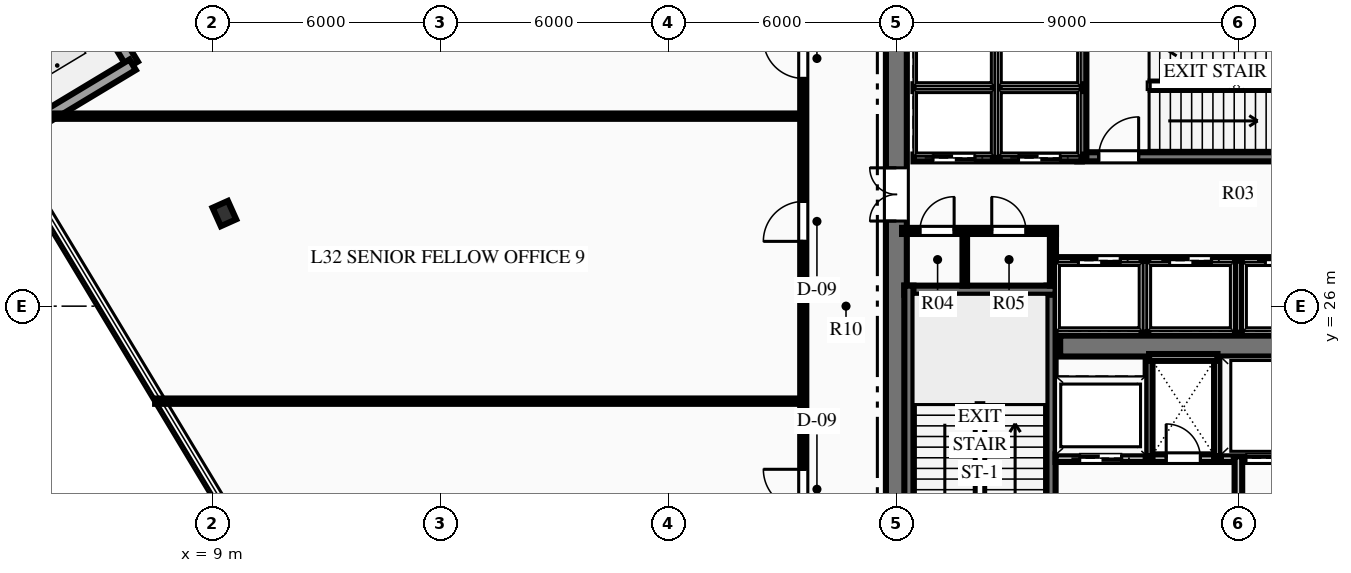
"""IFC4 building model, lengths in metres.
Left out: names, types, materials, properties, quantities, classifications, styles, units other than length and angle.
Written with IfcOpenShell. Run it as: python <this file> out.ifc"""

import sys

from ifc_helpers import new_model, si_unit, direction, frame, frame_2d, origin, origin_2d, place, context, subcontext, project, spatial, rectangle, i_section, extrude, element, fill, save


model = new_model("IFC4")
c1 = context("Model", 3, precision=1e-05, world=origin(), true_north=direction((0.0, 1.0)))
c2 = subcontext(c1, "Body", "Model", "MODEL_VIEW")
j1 = project(units=[si_unit("LENGTHUNIT", "METRE"), si_unit("PLANEANGLEUNIT", "RADIAN")], contexts=[c1])
p1 = place(None, origin())
s1 = spatial("IfcSite", under=j1, at=p1, CompositionType="ELEMENT")
p2 = place(p1, origin())
s2 = spatial("IfcBuilding", under=s1, at=p2, CompositionType="ELEMENT")
p3 = place(p2, frame((0.0, 0.0, 131.7)))
s3 = spatial("IfcBuildingStorey", under=s2, at=p3, CompositionType="ELEMENT", Elevation=131.7)
p4 = place(p3, frame((27.0, 18.275, 0.0), z_axis=(0.0, 0.0, 1.0), x_axis=(0.0, 1.0, 0.0)))
e1 = element("IfcWall", 1, at=p4, inside=s3, PredefinedType="SHEAR", context=c2, shape_type="SweptSolid", body=[
    extrude(rectangle(XDim=15.45, YDim=0.55, at=frame_2d((7.725, 0.0))), origin(), (0.0, 0.0, 1.0), 4.5),
])
p5 = place(p4, frame((9.965, 0.0, 0.0)))
e2 = element("IfcOpeningElement", 2, at=p5, cuts=e1, PredefinedType="OPENING", context=c2, shape_type="SweptSolid", body=[
    extrude(rectangle(XDim=1.4, YDim=2.2, at=frame_2d((0.7, 1.1))), frame((0.0, 0.285, 0.0), z_axis=(0.0, -1.0, 0.0), x_axis=(1.0, 0.0, 0.0)), (0.0, 0.0, 1.0), 0.57),
])
p6 = place(p3, frame((31.31, 24.95, 0.0), z_axis=(0.0, 0.0, 1.0), x_axis=(1.0, 0.0, 0.0)))
e3 = element("IfcWall", 3, at=p6, inside=s3, PredefinedType="SHEAR", context=c2, shape_type="SweptSolid", body=[
    extrude(rectangle(XDim=9.38, YDim=0.55, at=frame_2d((4.69, 0.0))), origin(), (0.0, 0.0, 1.0), 4.5),
])
p7 = place(p3, frame((31.07, 18.28, 0.0), z_axis=(0.0, 0.0, 1.0), x_axis=(0.0, 1.0, 0.0)))
e4 = element("IfcWall", 4, at=p7, inside=s3, PredefinedType="SHEAR", context=c2, shape_type="SweptSolid", body=[
    extrude(rectangle(XDim=8.26, YDim=0.24, at=frame_2d((4.13, 0.0))), origin(), (0.0, 0.0, 1.0), 4.5),
])
p8 = place(p7, frame((0.365, 0.0, 0.0)))
e5 = element("IfcOpeningElement", 5, at=p8, cuts=e4, PredefinedType="OPENING", context=c2, shape_type="SweptSolid", body=[
    extrude(rectangle(XDim=1.05, YDim=2.15, at=frame_2d((0.525, 1.075))), frame((0.0, 0.13, 0.0), z_axis=(0.0, -1.0, 0.0), x_axis=(1.0, 0.0, 0.0)), (0.0, 0.0, 1.0), 0.26),
])
p9 = place(p3, frame((27.21, 26.42, 0.0), z_axis=(0.0, 0.0, 1.0), x_axis=(1.0, 0.0, 0.0)))
e6 = element("IfcWall", 6, at=p9, inside=s3, PredefinedType="SHEAR", context=c2, shape_type="SweptSolid", body=[
    extrude(rectangle(XDim=3.98, YDim=0.24, at=frame_2d((1.99, 0.0))), origin(), (0.0, 0.0, 1.0), 4.5),
])
p10 = place(p3, frame((27.33, 18.28, 0.0), z_axis=(0.0, 0.0, 1.0), x_axis=(0.0, 1.0, 0.0)))
e7 = element("IfcWall", 7, at=p10, inside=s3, PredefinedType="SHEAR", context=c2, shape_type="SweptSolid", body=[
    extrude(rectangle(XDim=8.26, YDim=0.24, at=frame_2d((4.13, 0.0))), origin(), (0.0, 0.0, 1.0), 4.5),
])
p11 = place(p3, frame((31.76, 29.93, 0.0), z_axis=(0.0, 0.0, 1.0), x_axis=(1.0, 0.0, 0.0)))
e8 = element("IfcWall", 8, at=p11, inside=s3, PredefinedType="SHEAR", context=c2, shape_type="SweptSolid", body=[
    extrude(rectangle(XDim=8.38, YDim=0.24, at=frame_2d((4.19, 0.0))), origin(), (0.0, 0.0, 1.0), 4.5),
])
p12 = place(p11, frame((0.565, 0.0, 0.0)))
e9 = element("IfcOpeningElement", 9, at=p12, cuts=e8, PredefinedType="OPENING", context=c2, shape_type="SweptSolid", body=[
    extrude(rectangle(XDim=1.05, YDim=2.15, at=frame_2d((0.525, 1.075))), frame((0.0, 0.13, 0.0), z_axis=(0.0, -1.0, 0.0), x_axis=(1.0, 0.0, 0.0)), (0.0, 0.0, 1.0), 0.26),
])
p13 = place(p3, frame((31.88, 29.93, 0.0), z_axis=(0.0, 0.0, 1.0), x_axis=(0.0, 1.0, 0.0)))
e10 = element("IfcWall", 10, at=p13, inside=s3, PredefinedType="SHEAR", context=c2, shape_type="SweptSolid", body=[
    extrude(rectangle(XDim=3.79, YDim=0.24, at=frame_2d((1.895, 0.0))), origin(), (0.0, 0.0, 1.0), 4.5),
])
p14 = place(p3, frame((9.318, 28.437, 0.0), z_axis=(0.0, 0.0, 1.0), x_axis=(0.912477494148, 0.409126902895, 0.0)))
e11 = element("IfcColumn", 11, at=p14, inside=s3, PredefinedType="COLUMN", context=c2, shape_type="SweptSolid", body=[
    extrude(i_section(OverallWidth=0.442, OverallDepth=0.531, WebThickness=0.066, FlangeThickness=0.106, at=origin_2d()), origin(), (0.0, 0.0, 1.0), 4.5),
])
p15 = place(p3, frame((6.904, 32.353, 0.0), z_axis=(0.0, 0.0, 1.0), x_axis=(-0.515773637009, 0.856724900634, 0.0)))
e12 = element("IfcWall", 12, at=p15, inside=s3, PredefinedType="STANDARD", context=c2, shape_type="SweptSolid", body=[
    extrude(rectangle(XDim=4.1, YDim=0.32, at=frame_2d((2.05, 0.0))), origin(), (0.0, 0.0, 1.0), 4.1),
])
p16 = place(p15, frame((1.475, 0.0, 0.0)))
e13 = element("IfcOpeningElement", 13, at=p16, cuts=e12, PredefinedType="OPENING", context=c2, shape_type="SweptSolid", body=[
    extrude(rectangle(XDim=1.15, YDim=2.2, at=frame_2d((0.575, 1.1))), frame((0.0, 0.17, 0.0), z_axis=(0.0, -1.0, 0.0), x_axis=(1.0, 0.0, 0.0)), (0.0, 0.0, 1.0), 0.34),
])
p17 = place(p3, frame((3.392, 30.238, 0.0), z_axis=(0.0, 0.0, 1.0), x_axis=(0.856724900634, 0.515773637009, 0.0)))
e14 = element("IfcWall", 14, at=p17, inside=s3, PredefinedType="STANDARD", context=c2, shape_type="SweptSolid", body=[
    extrude(rectangle(XDim=4.1, YDim=0.32, at=frame_2d((2.05, 0.0))), origin(), (0.0, 0.0, 1.0), 4.1),
])
p18 = place(p3, frame((36.0, 18.28, 0.0), z_axis=(0.0, 0.0, 1.0), x_axis=(0.0, 1.0, 0.0)))
e15 = element("IfcWall", 15, at=p18, inside=s3, PredefinedType="PARTITIONING", context=c2, shape_type="SweptSolid", body=[
    extrude(rectangle(XDim=3.77, YDim=0.2, at=frame_2d((1.885, 0.0))), origin(), (0.0, 0.0, 1.0), 4.1),
])
p19 = place(p3, frame((31.19, 22.0, 0.0), z_axis=(0.0, 0.0, 1.0), x_axis=(1.0, 0.0, 0.0)))
e16 = element("IfcWall", 16, at=p19, inside=s3, PredefinedType="PARTITIONING", context=c2, shape_type="SweptSolid", body=[
    extrude(rectangle(XDim=4.69, YDim=0.2, at=frame_2d((2.345, 0.0))), origin(), (0.0, 0.0, 1.0), 4.1),
])
p20 = place(p19, frame((2.91, 0.0, 0.0)))
e17 = element("IfcOpeningElement", 17, at=p20, cuts=e16, PredefinedType="OPENING", context=c2, shape_type="SweptSolid", body=[
    extrude(rectangle(XDim=0.9, YDim=2.15, at=frame_2d((0.45, 1.075))), frame((0.0, 0.11, 0.0), z_axis=(0.0, -1.0, 0.0), x_axis=(1.0, 0.0, 0.0)), (0.0, 0.0, 1.0), 0.22),
])
p21 = place(p19, frame((0.635, 0.0, 0.0)))
e18 = element("IfcOpeningElement", 18, at=p21, cuts=e16, PredefinedType="OPENING", context=c2, shape_type="SweptSolid", body=[
    extrude(rectangle(XDim=1.1, YDim=2.15, at=frame_2d((0.55, 1.075))), frame((0.0, 0.11, 0.0), z_axis=(0.0, -1.0, 0.0), x_axis=(1.0, 0.0, 0.0)), (0.0, 0.0, 1.0), 0.22),
])
p22 = place(p3, frame((36.12, 22.0, 0.0), z_axis=(0.0, 0.0, 1.0), x_axis=(1.0, 0.0, 0.0)))
e19 = element("IfcWall", 19, at=p22, inside=s3, PredefinedType="PARTITIONING", context=c2, shape_type="SweptSolid", body=[
    extrude(rectangle(XDim=4.69, YDim=0.2, at=frame_2d((2.345, 0.0))), origin(), (0.0, 0.0, 1.0), 4.1),
])
p23 = place(p22, frame((2.955, 0.0, 0.0)))
e20 = element("IfcOpeningElement", 20, at=p23, cuts=e19, PredefinedType="OPENING", context=c2, shape_type="SweptSolid", body=[
    extrude(rectangle(XDim=1.1, YDim=2.15, at=frame_2d((0.55, 1.075))), frame((0.0, 0.11, 0.0), z_axis=(0.0, -1.0, 0.0), x_axis=(1.0, 0.0, 0.0)), (0.0, 0.0, 1.0), 0.22),
])
p24 = place(p22, frame((0.08, 0.0, 0.0)))
e21 = element("IfcOpeningElement", 21, at=p24, cuts=e19, PredefinedType="OPENING", context=c2, shape_type="SweptSolid", body=[
    extrude(rectangle(XDim=1.4, YDim=2.2, at=frame_2d((0.7, 1.1))), frame((0.0, 0.11, 0.0), z_axis=(0.0, -1.0, 0.0), x_axis=(1.0, 0.0, 0.0)), (0.0, 0.0, 1.0), 0.22),
])
for number, where, z_axis, x_axis in (
    (22, (33.65, 22.05, 0.0), (0.0, 0.0, 1.0), (0.0, 1.0, 0.0)),
    (23, (35.45, 22.05, 0.0), (0.0, 0.0, 1.0), (0.0, 1.0, 0.0)),
):
    element("IfcWall", number, at=place(p3, frame(where, z_axis=z_axis, x_axis=x_axis)), inside=s3, PredefinedType="PARTITIONING", context=c2, shape_type="SweptSolid", body=[
        extrude(rectangle(XDim=2.6, YDim=0.18, at=frame_2d((1.3, 0.0))), origin(), (0.0, 0.0, 1.0), 4.1),
    ])
p25 = place(p3, frame((33.65, 24.65, 0.0), z_axis=(0.0, 0.0, 1.0), x_axis=(1.0, 0.0, 0.0)))
e24 = element("IfcWall", 24, at=p25, inside=s3, PredefinedType="PARTITIONING", context=c2, shape_type="SweptSolid", body=[
    extrude(rectangle(XDim=1.8, YDim=0.18, at=frame_2d((0.9, 0.0))), origin(), (0.0, 0.0, 1.0), 4.1),
])
p26 = place(p3, frame((27.15, 27.98, 0.0), z_axis=(0.0, 0.0, 1.0), x_axis=(1.0, 0.0, 0.0)))
e25 = element("IfcWall", 25, at=p26, inside=s3, PredefinedType="PARTITIONING", context=c2, shape_type="SweptSolid", body=[
    extrude(rectangle(XDim=4.05, YDim=0.16, at=frame_2d((2.025, 0.0))), origin(), (0.0, 0.0, 1.0), 4.1),
])
p27 = place(p26, frame((0.47, 0.0, 0.0)))
e26 = element("IfcOpeningElement", 26, at=p27, cuts=e25, PredefinedType="OPENING", context=c2, shape_type="SweptSolid", body=[
    extrude(rectangle(XDim=0.9, YDim=2.15, at=frame_2d((0.45, 1.075))), frame((0.0, 0.09, 0.0), z_axis=(0.0, -1.0, 0.0), x_axis=(1.0, 0.0, 0.0)), (0.0, 0.0, 1.0), 0.18),
])
p28 = place(p26, frame((2.36, 0.0, 0.0)))
e27 = element("IfcOpeningElement", 27, at=p28, cuts=e25, PredefinedType="OPENING", context=c2, shape_type="SweptSolid", body=[
    extrude(rectangle(XDim=0.9, YDim=2.15, at=frame_2d((0.45, 1.075))), frame((0.0, 0.09, 0.0), z_axis=(0.0, -1.0, 0.0), x_axis=(1.0, 0.0, 0.0)), (0.0, 0.0, 1.0), 0.18),
])
p29 = place(p3, frame((31.12, 26.54, 0.0), z_axis=(0.0, 0.0, 1.0), x_axis=(0.0, 1.0, 0.0)))
e28 = element("IfcWall", 28, at=p29, inside=s3, PredefinedType="PARTITIONING", context=c2, shape_type="SweptSolid", body=[
    extrude(rectangle(XDim=1.51, YDim=0.16, at=frame_2d((0.755, 0.0))), origin(), (0.0, 0.0, 1.0), 4.1),
])
p30 = place(p3, frame((28.8, 26.54, 0.0), z_axis=(0.0, 0.0, 1.0), x_axis=(0.0, 1.0, 0.0)))
e29 = element("IfcWall", 29, at=p30, inside=s3, PredefinedType="PARTITIONING", context=c2, shape_type="SweptSolid", body=[
    extrude(rectangle(XDim=1.44, YDim=0.12, at=frame_2d((0.72, 0.0))), origin(), (0.0, 0.0, 1.0), 4.1),
])
p31 = place(p3, frame((27.45, 29.9, 0.0), z_axis=(0.0, 0.0, 1.0), x_axis=(1.0, 0.0, 0.0)))
e30 = element("IfcWall", 30, at=p31, inside=s3, PredefinedType="PARTITIONING", context=c2, shape_type="SweptSolid", body=[
    extrude(rectangle(XDim=4.43, YDim=0.18, at=frame_2d((2.215, 0.0))), origin(), (0.0, 0.0, 1.0), 4.1),
])
p32 = place(p31, frame((0.515, 0.0, 0.0)))
e31 = element("IfcOpeningElement", 31, at=p32, cuts=e30, PredefinedType="OPENING", context=c2, shape_type="SweptSolid", body=[
    extrude(rectangle(XDim=1.1, YDim=2.15, at=frame_2d((0.55, 1.075))), frame((0.0, 0.1, 0.0), z_axis=(0.0, -1.0, 0.0), x_axis=(1.0, 0.0, 0.0)), (0.0, 0.0, 1.0), 0.2),
])
p33 = place(p31, frame((2.765, 0.0, 0.0)))
e32 = element("IfcOpeningElement", 32, at=p33, cuts=e30, PredefinedType="OPENING", context=c2, shape_type="SweptSolid", body=[
    extrude(rectangle(XDim=1.1, YDim=2.15, at=frame_2d((0.55, 1.075))), frame((0.0, 0.1, 0.0), z_axis=(0.0, -1.0, 0.0), x_axis=(1.0, 0.0, 0.0)), (0.0, 0.0, 1.0), 0.2),
])
p34 = place(p3, frame((27.45, 31.75, 0.0), z_axis=(0.0, 0.0, 1.0), x_axis=(1.0, 0.0, 0.0)))
e33 = element("IfcWall", 33, at=p34, inside=s3, PredefinedType="PARTITIONING", context=c2, shape_type="SweptSolid", body=[
    extrude(rectangle(XDim=4.43, YDim=0.18, at=frame_2d((2.215, 0.0))), origin(), (0.0, 0.0, 1.0), 4.1),
])
p35 = place(p3, frame((29.63, 29.9, 0.0), z_axis=(0.0, 0.0, 1.0), x_axis=(0.0, 1.0, 0.0)))
e34 = element("IfcWall", 34, at=p35, inside=s3, PredefinedType="PARTITIONING", context=c2, shape_type="SweptSolid", body=[
    extrude(rectangle(XDim=3.75, YDim=0.18, at=frame_2d((1.875, 0.0))), origin(), (0.0, 0.0, 1.0), 4.1),
])
p36 = place(p3, frame((31.2, 27.2, 0.0), z_axis=(0.0, 0.0, 1.0), x_axis=(1.0, 0.0, 0.0)))
e35 = element("IfcWall", 35, at=p36, inside=s3, PredefinedType="PARTITIONING", context=c2, shape_type="SweptSolid", body=[
    extrude(rectangle(XDim=9.6, YDim=0.18, at=frame_2d((4.8, 0.0))), origin(), (0.0, 0.0, 1.0), 4.1),
])
p37 = place(p36, frame((0.59, 0.0, 0.0)))
e36 = element("IfcOpeningElement", 36, at=p37, cuts=e35, PredefinedType="OPENING", context=c2, shape_type="SweptSolid", body=[
    extrude(rectangle(XDim=1.1, YDim=2.15, at=frame_2d((0.55, 1.075))), frame((0.0, 0.1, 0.0), z_axis=(0.0, -1.0, 0.0), x_axis=(1.0, 0.0, 0.0)), (0.0, 0.0, 1.0), 0.2),
])
p38 = place(p36, frame((2.99, 0.0, 0.0)))
e37 = element("IfcOpeningElement", 37, at=p38, cuts=e35, PredefinedType="OPENING", context=c2, shape_type="SweptSolid", body=[
    extrude(rectangle(XDim=1.1, YDim=2.15, at=frame_2d((0.55, 1.075))), frame((0.0, 0.1, 0.0), z_axis=(0.0, -1.0, 0.0), x_axis=(1.0, 0.0, 0.0)), (0.0, 0.0, 1.0), 0.2),
])
p39 = place(p36, frame((5.51, 0.0, 0.0)))
e38 = element("IfcOpeningElement", 38, at=p39, cuts=e35, PredefinedType="OPENING", context=c2, shape_type="SweptSolid", body=[
    extrude(rectangle(XDim=1.1, YDim=2.15, at=frame_2d((0.55, 1.075))), frame((0.0, 0.1, 0.0), z_axis=(0.0, -1.0, 0.0), x_axis=(1.0, 0.0, 0.0)), (0.0, 0.0, 1.0), 0.2),
])
p40 = place(p36, frame((7.91, 0.0, 0.0)))
e39 = element("IfcOpeningElement", 39, at=p40, cuts=e35, PredefinedType="OPENING", context=c2, shape_type="SweptSolid", body=[
    extrude(rectangle(XDim=1.1, YDim=2.15, at=frame_2d((0.55, 1.075))), frame((0.0, 0.1, 0.0), z_axis=(0.0, -1.0, 0.0), x_axis=(1.0, 0.0, 0.0)), (0.0, 0.0, 1.0), 0.2),
])
for number, where, z_axis, x_axis in (
    (40, (33.54, 25.3, 0.0), (0.0, 0.0, 1.0), (0.0, 1.0, 0.0)),
    (41, (36.0, 25.3, 0.0), (0.0, 0.0, 1.0), (0.0, 1.0, 0.0)),
):
    element("IfcWall", number, at=place(p3, frame(where, z_axis=z_axis, x_axis=x_axis)), inside=s3, PredefinedType="PARTITIONING", context=c2, shape_type="SweptSolid", body=[
        extrude(rectangle(XDim=1.9, YDim=0.18, at=frame_2d((0.95, 0.0))), origin(), (0.0, 0.0, 1.0), 4.1),
    ])
p41 = place(p3, frame((24.55, 15.55, 0.0), z_axis=(0.0, 0.0, 1.0), x_axis=(0.0, 1.0, 0.0)))
e42 = element("IfcWall", 42, at=p41, inside=s3, PredefinedType="PARTITIONING", context=c2, shape_type="SweptSolid", body=[
    extrude(rectangle(XDim=20.9, YDim=0.16, at=frame_2d((10.45, 0.0))), origin(), (0.0, 0.0, 1.0), 4.1),
])
p42 = place(p41, frame((5.107, 0.0, 0.0)))
e43 = element("IfcOpeningElement", 43, at=p42, cuts=e42, PredefinedType="OPENING", context=c2, shape_type="SweptSolid", body=[
    extrude(rectangle(XDim=1.05, YDim=2.15, at=frame_2d((0.525, 1.075))), frame((0.0, 0.09, 0.0), z_axis=(0.0, -1.0, 0.0), x_axis=(1.0, 0.0, 0.0)), (0.0, 0.0, 1.0), 0.18),
])
p43 = place(p41, frame((12.155, 0.0, 0.0)))
e44 = element("IfcOpeningElement", 44, at=p43, cuts=e42, PredefinedType="OPENING", context=c2, shape_type="SweptSolid", body=[
    extrude(rectangle(XDim=1.05, YDim=2.15, at=frame_2d((0.525, 1.075))), frame((0.0, 0.09, 0.0), z_axis=(0.0, -1.0, 0.0), x_axis=(1.0, 0.0, 0.0)), (0.0, 0.0, 1.0), 0.18),
])
p44 = place(p41, frame((16.443, 0.0, 0.0)))
e45 = element("IfcOpeningElement", 45, at=p44, cuts=e42, PredefinedType="OPENING", context=c2, shape_type="SweptSolid", body=[
    extrude(rectangle(XDim=1.05, YDim=2.15, at=frame_2d((0.525, 1.075))), frame((0.0, 0.09, 0.0), z_axis=(0.0, -1.0, 0.0), x_axis=(1.0, 0.0, 0.0)), (0.0, 0.0, 1.0), 0.18),
])
p45 = place(p3, frame((7.495, 23.5, 0.0), z_axis=(0.0, 0.0, 1.0), x_axis=(1.0, 0.0, 0.0)))
e46 = element("IfcWall", 46, at=p45, inside=s3, PredefinedType="PARTITIONING", context=c2, shape_type="SweptSolid", body=[
    extrude(rectangle(XDim=17.055, YDim=0.14, at=frame_2d((8.527, 0.0))), origin(), (0.0, 0.0, 1.0), 4.1),
])
p46 = place(p3, frame((4.734, 31.0, 0.0), z_axis=(0.0, 0.0, 1.0), x_axis=(1.0, 0.0, 0.0)))
e47 = element("IfcWall", 47, at=p46, inside=s3, PredefinedType="PARTITIONING", context=c2, shape_type="SweptSolid", body=[
    extrude(rectangle(XDim=19.816, YDim=0.14, at=frame_2d((9.908, 0.0))), origin(), (0.0, 0.0, 1.0), 4.1),
])
p47 = place(p27, origin())
e48 = element("IfcDoor", 48, at=p47, inside=s3, OperationType="SINGLE_SWING_RIGHT", PredefinedType="DOOR", context=c2, shape_type="SweptSolid", body=[
    extrude(rectangle(XDim=0.9, YDim=2.15, at=frame_2d((0.45, 1.075))), frame((0.0, 0.025, 0.0), z_axis=(0.0, -1.0, 0.0), x_axis=(1.0, 0.0, 0.0)), (0.0, 0.0, 1.0), 0.05),
])
fill(e26, e48)
p48 = place(p28, origin())
e49 = element("IfcDoor", 49, at=p48, inside=s3, OperationType="SINGLE_SWING_LEFT", PredefinedType="DOOR", context=c2, shape_type="SweptSolid", body=[
    extrude(rectangle(XDim=0.9, YDim=2.15, at=frame_2d((0.45, 1.075))), frame((0.0, 0.025, 0.0), z_axis=(0.0, -1.0, 0.0), x_axis=(1.0, 0.0, 0.0)), (0.0, 0.0, 1.0), 0.05),
])
fill(e27, e49)
p49 = place(p12, origin())
e50 = element("IfcDoor", 50, at=p49, inside=s3, OperationType="SINGLE_SWING_RIGHT", PredefinedType="DOOR", context=c2, shape_type="SweptSolid", body=[
    extrude(rectangle(XDim=1.05, YDim=2.15, at=frame_2d((0.525, 1.075))), frame((0.0, 0.025, 0.0), z_axis=(0.0, -1.0, 0.0), x_axis=(1.0, 0.0, 0.0)), (0.0, 0.0, 1.0), 0.05),
])
fill(e9, e50)
p50 = place(p20, origin())
e51 = element("IfcDoor", 51, at=p50, inside=s3, OperationType="SINGLE_SWING_LEFT", PredefinedType="DOOR", context=c2, shape_type="SweptSolid", body=[
    extrude(rectangle(XDim=0.9, YDim=2.15, at=frame_2d((0.45, 1.075))), frame((0.0, 0.025, 0.0), z_axis=(0.0, -1.0, 0.0), x_axis=(1.0, 0.0, 0.0)), (0.0, 0.0, 1.0), 0.05),
])
fill(e17, e51)
p51 = place(p5, origin())
e52 = element("IfcDoor", 52, at=p51, inside=s3, OperationType="DOUBLE_DOOR_SINGLE_SWING", PredefinedType="DOOR", context=c2, shape_type="SweptSolid", body=[
    extrude(rectangle(XDim=1.4, YDim=2.2, at=frame_2d((0.7, 1.1))), frame((0.0, 0.025, 0.0), z_axis=(0.0, -1.0, 0.0), x_axis=(1.0, 0.0, 0.0)), (0.0, 0.0, 1.0), 0.05),
])
fill(e2, e52)
p52 = place(p42, origin())
e53 = element("IfcDoor", 53, at=p52, inside=s3, OperationType="SINGLE_SWING_RIGHT", PredefinedType="DOOR", context=c2, shape_type="SweptSolid", body=[
    extrude(rectangle(XDim=1.05, YDim=2.15, at=frame_2d((0.525, 1.075))), frame((0.0, 0.025, 0.0), z_axis=(0.0, -1.0, 0.0), x_axis=(1.0, 0.0, 0.0)), (0.0, 0.0, 1.0), 0.05),
])
fill(e43, e53)
p53 = place(p43, origin())
e54 = element("IfcDoor", 54, at=p53, inside=s3, OperationType="SINGLE_SWING_LEFT", PredefinedType="DOOR", context=c2, shape_type="SweptSolid", body=[
    extrude(rectangle(XDim=1.05, YDim=2.15, at=frame_2d((0.525, 1.075))), frame((0.0, 0.025, 0.0), z_axis=(0.0, -1.0, 0.0), x_axis=(1.0, 0.0, 0.0)), (0.0, 0.0, 1.0), 0.05),
])
fill(e44, e54)
p54 = place(p44, origin())
e55 = element("IfcDoor", 55, at=p54, inside=s3, OperationType="SINGLE_SWING_RIGHT", PredefinedType="DOOR", context=c2, shape_type="SweptSolid", body=[
    extrude(rectangle(XDim=1.05, YDim=2.15, at=frame_2d((0.525, 1.075))), frame((0.0, 0.025, 0.0), z_axis=(0.0, -1.0, 0.0), x_axis=(1.0, 0.0, 0.0)), (0.0, 0.0, 1.0), 0.05),
])
fill(e45, e55)
p55 = place(p32, origin())
e56 = element("IfcDoor", 56, at=p55, inside=s3, OperationType="SLIDING_TO_LEFT", PredefinedType="DOOR", context=c2, shape_type="SweptSolid", body=[
    extrude(rectangle(XDim=1.1, YDim=2.15, at=frame_2d((0.55, 1.075))), frame((0.0, 0.025, 0.0), z_axis=(0.0, -1.0, 0.0), x_axis=(1.0, 0.0, 0.0)), (0.0, 0.0, 1.0), 0.05),
])
fill(e31, e56)
p56 = place(p33, origin())
e57 = element("IfcDoor", 57, at=p56, inside=s3, OperationType="SLIDING_TO_LEFT", PredefinedType="DOOR", context=c2, shape_type="SweptSolid", body=[
    extrude(rectangle(XDim=1.1, YDim=2.15, at=frame_2d((0.55, 1.075))), frame((0.0, 0.025, 0.0), z_axis=(0.0, -1.0, 0.0), x_axis=(1.0, 0.0, 0.0)), (0.0, 0.0, 1.0), 0.05),
])
fill(e32, e57)
p57 = place(p37, origin())
e58 = element("IfcDoor", 58, at=p57, inside=s3, OperationType="SLIDING_TO_LEFT", PredefinedType="DOOR", context=c2, shape_type="SweptSolid", body=[
    extrude(rectangle(XDim=1.1, YDim=2.15, at=frame_2d((0.55, 1.075))), frame((0.0, 0.025, 0.0), z_axis=(0.0, -1.0, 0.0), x_axis=(1.0, 0.0, 0.0)), (0.0, 0.0, 1.0), 0.05),
])
fill(e36, e58)
p58 = place(p38, origin())
e59 = element("IfcDoor", 59, at=p58, inside=s3, OperationType="SLIDING_TO_LEFT", PredefinedType="DOOR", context=c2, shape_type="SweptSolid", body=[
    extrude(rectangle(XDim=1.1, YDim=2.15, at=frame_2d((0.55, 1.075))), frame((0.0, 0.025, 0.0), z_axis=(0.0, -1.0, 0.0), x_axis=(1.0, 0.0, 0.0)), (0.0, 0.0, 1.0), 0.05),
])
fill(e37, e59)
p59 = place(p39, origin())
e60 = element("IfcDoor", 60, at=p59, inside=s3, OperationType="SLIDING_TO_LEFT", PredefinedType="DOOR", context=c2, shape_type="SweptSolid", body=[
    extrude(rectangle(XDim=1.1, YDim=2.15, at=frame_2d((0.55, 1.075))), frame((0.0, 0.025, 0.0), z_axis=(0.0, -1.0, 0.0), x_axis=(1.0, 0.0, 0.0)), (0.0, 0.0, 1.0), 0.05),
])
fill(e38, e60)
p60 = place(p21, origin())
e61 = element("IfcDoor", 61, at=p60, inside=s3, OperationType="SLIDING_TO_LEFT", PredefinedType="DOOR", context=c2, shape_type="SweptSolid", body=[
    extrude(rectangle(XDim=1.1, YDim=2.15, at=frame_2d((0.55, 1.075))), frame((0.0, 0.025, 0.0), z_axis=(0.0, -1.0, 0.0), x_axis=(1.0, 0.0, 0.0)), (0.0, 0.0, 1.0), 0.05),
])
fill(e18, e61)
p61 = place(p24, origin())
e62 = element("IfcDoor", 62, at=p61, inside=s3, OperationType="SLIDING_TO_LEFT", PredefinedType="DOOR", context=c2, shape_type="SweptSolid", body=[
    extrude(rectangle(XDim=1.4, YDim=2.2, at=frame_2d((0.7, 1.1))), frame((0.0, 0.025, 0.0), z_axis=(0.0, -1.0, 0.0), x_axis=(1.0, 0.0, 0.0)), (0.0, 0.0, 1.0), 0.05),
])
fill(e21, e62)
save(model, sys.argv[1])
